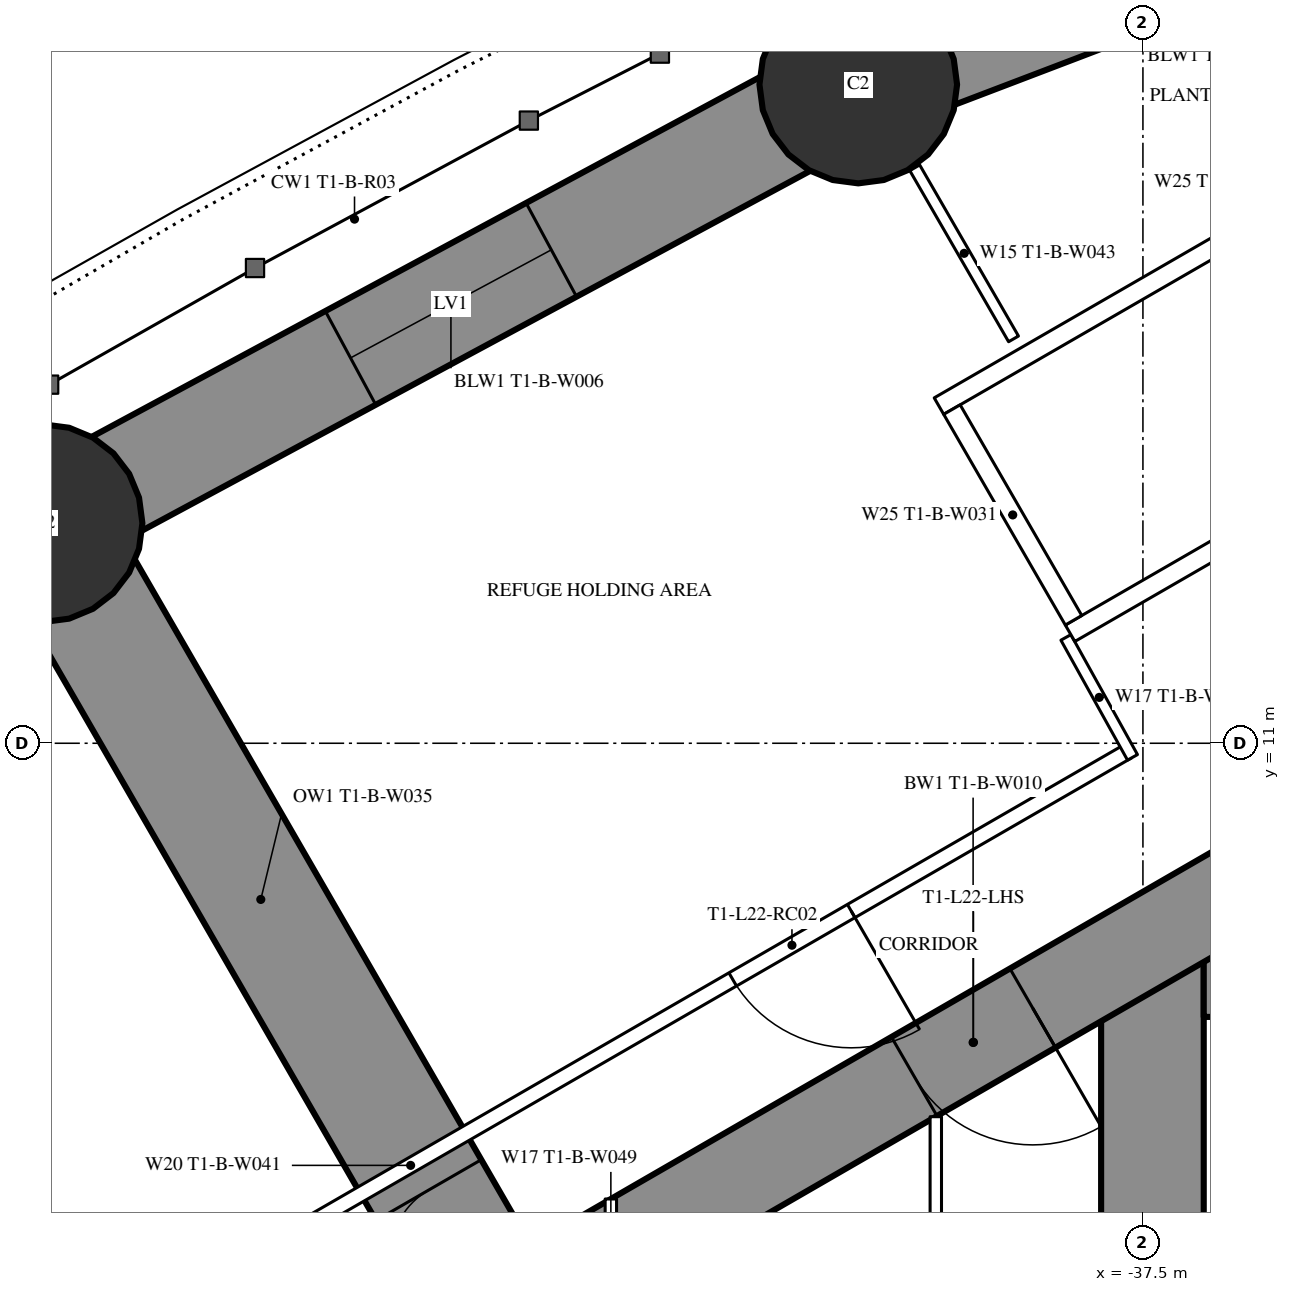
"""IFC4 building model, lengths in metres.
Left out: names, types, materials, properties, quantities, classifications, styles, units other than length and angle.
Written with IfcOpenShell. Run it as: python <this file> out.ifc"""

import sys

from ifc_helpers import new_model, si_unit, direction, frame, frame_2d, origin, origin_2d, place, context, subcontext, project, spatial, rectangle, hollow_circle, extrude, element, fill, save


model = new_model("IFC4")
c1 = context("Model", 3, precision=1e-05, world=origin(), true_north=direction((0.0, 1.0)))
c2 = subcontext(c1, "Body", "Model", "MODEL_VIEW")
j1 = project(units=[si_unit("LENGTHUNIT", "METRE"), si_unit("PLANEANGLEUNIT", "RADIAN")], contexts=[c1])
p1 = place(None, origin())
s1 = spatial("IfcSite", under=j1, at=p1, CompositionType="ELEMENT")
p2 = place(p1, origin())
s2 = spatial("IfcBuilding", under=s1, at=p2, CompositionType="ELEMENT")
p3 = place(p2, frame((0.0, 0.0, 87.0)))
s3 = spatial("IfcBuildingStorey", under=s2, at=p3, CompositionType="ELEMENT", Elevation=87.0)
for number, where, z_axis, x_axis in (
    (1, (-41.245, 19.666, 0.0), (0.0, 0.0, 1.0), (1.0, 0.0, 0.0)),
    (2, (-51.963, 13.895, 0.0), (0.0, 0.0, 1.0), (1.0, 0.0, 0.0)),
):
    element("IfcColumn", number, at=place(p3, frame(where, z_axis=z_axis, x_axis=x_axis)), inside=s3, PredefinedType="COLUMN", context=c2, shape_type="SweptSolid", body=[
        extrude(hollow_circle(Radius=1.3, WallThickness=0.1, at=origin_2d()), origin(), (0.0, 0.0, 1.0), 3.6),
    ])
p4 = place(p3, frame((-37.375, 8.6, 0.0), z_axis=(0.0, 0.0, 1.0), x_axis=(0.0, -1.0, 0.0)))
e3 = element("IfcWall", 3, at=p4, inside=s3, PredefinedType="SHEAR", context=c2, shape_type="SweptSolid", body=[
    extrude(rectangle(XDim=17.2, YDim=1.35, at=frame_2d((8.6, 0.0))), origin(), (0.0, 0.0, 1.0), 3.6),
])
p5 = place(p4, frame((7.7, 0.0, 0.0)))
e4 = element("IfcOpeningElement", 4, at=p5, cuts=e3, PredefinedType="OPENING", context=c2, shape_type="SweptSolid", body=[
    extrude(rectangle(XDim=1.8, YDim=2.2, at=frame_2d((0.9, 1.1))), frame((0.0, 0.685, 0.0), z_axis=(0.0, -1.0, 0.0), x_axis=(1.0, 0.0, 0.0)), (0.0, 0.0, 1.0), 1.37),
])
p6 = place(p3, frame((-28.3, 8.0, 0.0), z_axis=(0.0, 0.0, 1.0), x_axis=(-1.0, 0.0, 0.0)))
e5 = element("IfcWall", 5, at=p6, inside=s3, PredefinedType="SHEAR", context=c2, shape_type="SweptSolid", body=[
    extrude(rectangle(XDim=8.4, YDim=1.2, at=frame_2d((4.2, 0.0))), origin(), (0.0, 0.0, 1.0), 3.6),
])
p7 = place(p6, frame((0.25, 0.0, 0.0)))
e6 = element("IfcOpeningElement", 6, at=p7, cuts=e5, PredefinedType="OPENING", context=c2, shape_type="SweptSolid", body=[
    extrude(rectangle(XDim=1.0, YDim=2.2, at=frame_2d((0.5, 1.1))), frame((0.0, 0.61, 0.0), z_axis=(0.0, -1.0, 0.0), x_axis=(1.0, 0.0, 0.0)), (0.0, 0.0, 1.0), 1.22),
])
p8 = place(p3, frame((-27.2, 14.3, 0.0), z_axis=(0.0, 0.0, 1.0), x_axis=(-0.866026593062, -0.499997940104, 0.0)))
e7 = element("IfcWall", 7, at=p8, inside=s3, PredefinedType="SHEAR", context=c2, shape_type="SweptSolid", body=[
    extrude(rectangle(XDim=28.946, YDim=1.2, at=frame_2d((14.473, 0.0))), origin(), (0.0, 0.0, 1.0), 3.6),
])
p9 = place(p8, frame((4.6, 0.0, 0.0)))
e8 = element("IfcOpeningElement", 8, at=p9, cuts=e7, PredefinedType="OPENING", context=c2, shape_type="SweptSolid", body=[
    extrude(rectangle(XDim=1.0, YDim=2.2, at=frame_2d((0.5, 1.1))), frame((0.0, 0.61, 0.0), z_axis=(0.0, -1.0, 0.0), x_axis=(1.0, 0.0, 0.0)), (0.0, 0.0, 1.0), 1.22),
])
p10 = place(p8, frame((13.568, 0.0, 0.0)))
e9 = element("IfcOpeningElement", 9, at=p10, cuts=e7, PredefinedType="OPENING", context=c2, shape_type="SweptSolid", body=[
    extrude(rectangle(XDim=1.8, YDim=2.03, at=frame_2d((0.9, 1.015))), frame((0.0, 0.61, 0.0), z_axis=(0.0, -1.0, 0.0), x_axis=(1.0, 0.0, 0.0)), (0.0, 0.0, 1.0), 1.22),
])
p11 = place(p3, frame((-46.248, 3.996, 0.0), z_axis=(0.0, 0.0, 1.0), x_axis=(-0.499993613132, 0.866029091213, 0.0)))
e10 = element("IfcWall", 10, at=p11, inside=s3, PredefinedType="SHEAR", context=c2, shape_type="SweptSolid", body=[
    extrude(rectangle(XDim=11.431, YDim=1.6, at=frame_2d((5.715, 0.0))), origin(), (0.0, 0.0, 1.0), 3.6),
])
p12 = place(p11, frame((0.3, 0.0, 0.0)))
e11 = element("IfcOpeningElement", 11, at=p12, cuts=e10, PredefinedType="OPENING", context=c2, shape_type="SweptSolid", body=[
    extrude(rectangle(XDim=1.0, YDim=2.2, at=frame_2d((0.5, 1.1))), frame((0.0, 0.81, 0.0), z_axis=(0.0, -1.0, 0.0), x_axis=(1.0, 0.0, 0.0)), (0.0, 0.0, 1.0), 1.62),
])
p13 = place(p3, frame((-31.665, 23.318, 0.0), z_axis=(0.0, 0.0, 1.0), x_axis=(-0.934392266213, -0.356245832033, 0.0)))
e12 = element("IfcWall", 12, at=p13, inside=s3, PredefinedType="SHEAR", context=c2, shape_type="SweptSolid", body=[
    extrude(rectangle(XDim=10.253, YDim=1.4, at=frame_2d((5.126, 0.0))), origin(), (0.0, 0.0, 1.0), 3.6),
])
p14 = place(p13, frame((3.626, 0.0, 0.6)))
e13 = element("IfcOpeningElement", 13, at=p14, cuts=e12, PredefinedType="OPENING", context=c2, shape_type="SweptSolid", body=[
    extrude(rectangle(XDim=3.0, YDim=1.2, at=frame_2d((1.5, 0.6))), frame((0.0, 0.71, 0.0), z_axis=(0.0, -1.0, 0.0), x_axis=(1.0, 0.0, 0.0)), (0.0, 0.0, 1.0), 1.42),
])
p15 = place(p3, frame((-41.245, 19.666, 0.0), z_axis=(0.0, 0.0, 1.0), x_axis=(-0.880492350889, -0.474060354835, 0.0)))
e14 = element("IfcWall", 14, at=p15, inside=s3, PredefinedType="SHEAR", context=c2, shape_type="SweptSolid", body=[
    extrude(rectangle(XDim=12.173, YDim=1.4, at=frame_2d((6.086, 0.0))), origin(), (0.0, 0.0, 1.0), 3.6),
])
p16 = place(p15, frame((4.586, 0.0, 0.6)))
e15 = element("IfcOpeningElement", 15, at=p16, cuts=e14, PredefinedType="OPENING", context=c2, shape_type="SweptSolid", body=[
    extrude(rectangle(XDim=3.0, YDim=1.2, at=frame_2d((1.5, 0.6))), frame((0.0, 0.71, 0.0), z_axis=(0.0, -1.0, 0.0), x_axis=(1.0, 0.0, 0.0)), (0.0, 0.0, 1.0), 1.42),
])
p17 = place(p3, frame((-51.963, 13.895, 0.0), z_axis=(0.0, 0.0, 1.0), x_axis=(-0.848062521637, -0.529896177939, 0.0)))
e16 = element("IfcWall", 16, at=p17, inside=s3, PredefinedType="SHEAR", context=c2, shape_type="SweptSolid", body=[
    extrude(rectangle(XDim=12.173, YDim=1.4, at=frame_2d((6.086, 0.0))), origin(), (0.0, 0.0, 1.0), 3.6),
])
p18 = place(p17, frame((4.586, 0.0, 0.6)))
e17 = element("IfcOpeningElement", 17, at=p18, cuts=e16, PredefinedType="OPENING", context=c2, shape_type="SweptSolid", body=[
    extrude(rectangle(XDim=3.0, YDim=1.2, at=frame_2d((1.5, 0.6))), frame((0.0, 0.71, 0.0), z_axis=(0.0, -1.0, 0.0), x_axis=(1.0, 0.0, 0.0)), (0.0, 0.0, 1.0), 1.42),
])
p19 = place(p3, frame((-39.202, 16.32, 0.0), z_axis=(0.0, 0.0, 1.0), x_axis=(-0.499947391036, 0.866055775454, 0.0)))
e18 = element("IfcWall", 18, at=p19, inside=s3, PredefinedType="PARTITIONING", context=c2, shape_type="SweptSolid", body=[
    extrude(rectangle(XDim=2.599, YDim=0.15, at=frame_2d((1.3, 0.0))), origin(), (0.0, 0.0, 1.0), 3.35),
])
p20 = place(p3, frame((-37.7, 10.894, 0.0), z_axis=(0.0, 0.0, 1.0), x_axis=(-0.866027905338, -0.499995667157, 0.0)))
e19 = element("IfcWall", 19, at=p20, inside=s3, PredefinedType="PARTITIONING", context=c2, shape_type="SweptSolid", body=[
    extrude(rectangle(XDim=21.787, YDim=0.2, at=frame_2d((10.894, 0.0))), origin(), (0.0, 0.0, 1.0), 3.35),
])
p21 = place(p20, frame((15.094, 0.0, 0.0)))
e20 = element("IfcOpeningElement", 20, at=p21, cuts=e19, PredefinedType="OPENING", context=c2, shape_type="SweptSolid", body=[
    extrude(rectangle(XDim=1.8, YDim=2.2, at=frame_2d((0.9, 1.1))), frame((0.0, 0.11, 0.0), z_axis=(0.0, -1.0, 0.0), x_axis=(1.0, 0.0, 0.0)), (0.0, 0.0, 1.0), 0.22),
])
p22 = place(p20, frame((4.201, 0.0, 0.0)))
e21 = element("IfcOpeningElement", 21, at=p22, cuts=e19, PredefinedType="OPENING", context=c2, shape_type="SweptSolid", body=[
    extrude(rectangle(XDim=1.8, YDim=2.2, at=frame_2d((0.9, 1.1))), frame((0.0, 0.11, 0.0), z_axis=(0.0, -1.0, 0.0), x_axis=(1.0, 0.0, 0.0)), (0.0, 0.0, 1.0), 0.22),
])
p23 = place(p3, frame((-38.513, 12.392, 0.0), z_axis=(0.0, 0.0, 1.0), x_axis=(0.485585508183, -0.874189175317, 0.0)))
e22 = element("IfcWall", 22, at=p23, inside=s3, PredefinedType="PARTITIONING", context=c2, shape_type="SweptSolid", body=[
    extrude(rectangle(XDim=1.805, YDim=0.15, at=frame_2d((0.902, 0.0))), origin(), (0.0, 0.0, 1.0), 3.35),
])
p24 = place(p3, frame((-40.225, 6.087, 0.0), z_axis=(0.0, 0.0, 1.0), x_axis=(0.0, -1.0, 0.0)))
e23 = element("IfcWall", 23, at=p24, inside=s3, PredefinedType="PARTITIONING", context=c2, shape_type="SweptSolid", body=[
    extrude(rectangle(XDim=12.174, YDim=0.15, at=frame_2d((6.087, 0.0))), origin(), (0.0, 0.0, 1.0), 3.35),
])
p25 = place(p24, frame((5.187, 0.0, 0.0)))
e24 = element("IfcOpeningElement", 24, at=p25, cuts=e23, PredefinedType="OPENING", context=c2, shape_type="SweptSolid", body=[
    extrude(rectangle(XDim=1.8, YDim=2.2, at=frame_2d((0.9, 1.1))), frame((0.0, 0.085, 0.0), z_axis=(0.0, -1.0, 0.0), x_axis=(1.0, 0.0, 0.0)), (0.0, 0.0, 1.0), 0.17),
])
for number, where, z_axis, x_axis in (
    (25, (-31.01, 16.747, 0.0), (0.0, 0.0, 1.0), (-0.866, -0.5, 0.0)),
    (26, (-32.736, 19.736, 0.0), (0.0, 0.0, 1.0), (-0.866, -0.5, 0.0)),
):
    element("IfcWall", number, at=place(p3, frame(where, z_axis=z_axis, x_axis=x_axis)), inside=s3, PredefinedType="PARTITIONING", context=c2, shape_type="SweptSolid", body=[
        extrude(rectangle(XDim=8.6, YDim=0.25, at=frame_2d((4.3, 0.0))), origin(), (0.0, 0.0, 1.0), 3.35),
    ])
p26 = place(p3, frame((-38.413, 12.618, 0.0), z_axis=(0.0, 0.0, 1.0), x_axis=(-0.499872130319, 0.866099216793, 0.0)))
e27 = element("IfcWall", 27, at=p26, inside=s3, PredefinedType="PARTITIONING", context=c2, shape_type="SweptSolid", body=[
    extrude(rectangle(XDim=3.2, YDim=0.25, at=frame_2d((1.6, 0.0))), origin(), (0.0, 0.0, 1.0), 3.35),
])
p27 = place(p3, frame((-44.5, 5.005, 0.0), z_axis=(0.0, 0.0, 1.0), x_axis=(0.0, -1.0, 0.0)))
e28 = element("IfcWall", 28, at=p27, inside=s3, PredefinedType="PARTITIONING", context=c2, shape_type="SweptSolid", body=[
    extrude(rectangle(XDim=0.836, YDim=0.15, at=frame_2d((0.418, 0.0))), origin(), (0.0, 0.0, 1.0), 2.05),
])
p28 = place(p16, origin())
e29 = element("IfcWindow", 29, at=p28, inside=s3, PartitioningType="SINGLE_PANEL", PredefinedType="WINDOW", context=c2, shape_type="SweptSolid", body=[
    extrude(rectangle(XDim=3.0, YDim=1.2, at=frame_2d((1.5, 0.6))), frame((0.0, 0.03, 0.0), z_axis=(0.0, -1.0, 0.0), x_axis=(1.0, 0.0, 0.0)), (0.0, 0.0, 1.0), 0.06),
])
fill(e15, e29)
p29 = place(p12, origin())
e30 = element("IfcDoor", 30, at=p29, inside=s3, OperationType="SINGLE_SWING_LEFT", PredefinedType="DOOR", context=c2, shape_type="SweptSolid", body=[
    extrude(rectangle(XDim=1.0, YDim=2.2, at=frame_2d((0.5, 1.1))), frame((0.0, 0.025, 0.0), z_axis=(0.0, -1.0, 0.0), x_axis=(1.0, 0.0, 0.0)), (0.0, 0.0, 1.0), 0.05),
])
fill(e11, e30)
p30 = place(p22, origin())
e31 = element("IfcDoor", 31, at=p30, inside=s3, OperationType="DOUBLE_DOOR_SINGLE_SWING", PredefinedType="DOOR", context=c2, shape_type="SweptSolid", body=[
    extrude(rectangle(XDim=1.8, YDim=2.2, at=frame_2d((0.9, 1.1))), frame((0.0, 0.025, 0.0), z_axis=(0.0, -1.0, 0.0), x_axis=(1.0, 0.0, 0.0)), (0.0, 0.0, 1.0), 0.05),
])
fill(e21, e31)
p31 = place(p10, origin())
e32 = element("IfcDoor", 32, at=p31, inside=s3, OperationType="DOUBLE_DOOR_SINGLE_SWING", PredefinedType="DOOR", context=c2, shape_type="SweptSolid", body=[
    extrude(rectangle(XDim=1.8, YDim=2.03, at=frame_2d((0.9, 1.015))), frame((0.0, 0.025, 0.0), z_axis=(0.0, -1.0, 0.0), x_axis=(1.0, 0.0, 0.0)), (0.0, 0.0, 1.0), 0.05),
])
fill(e9, e32)
save(model, sys.argv[1])
